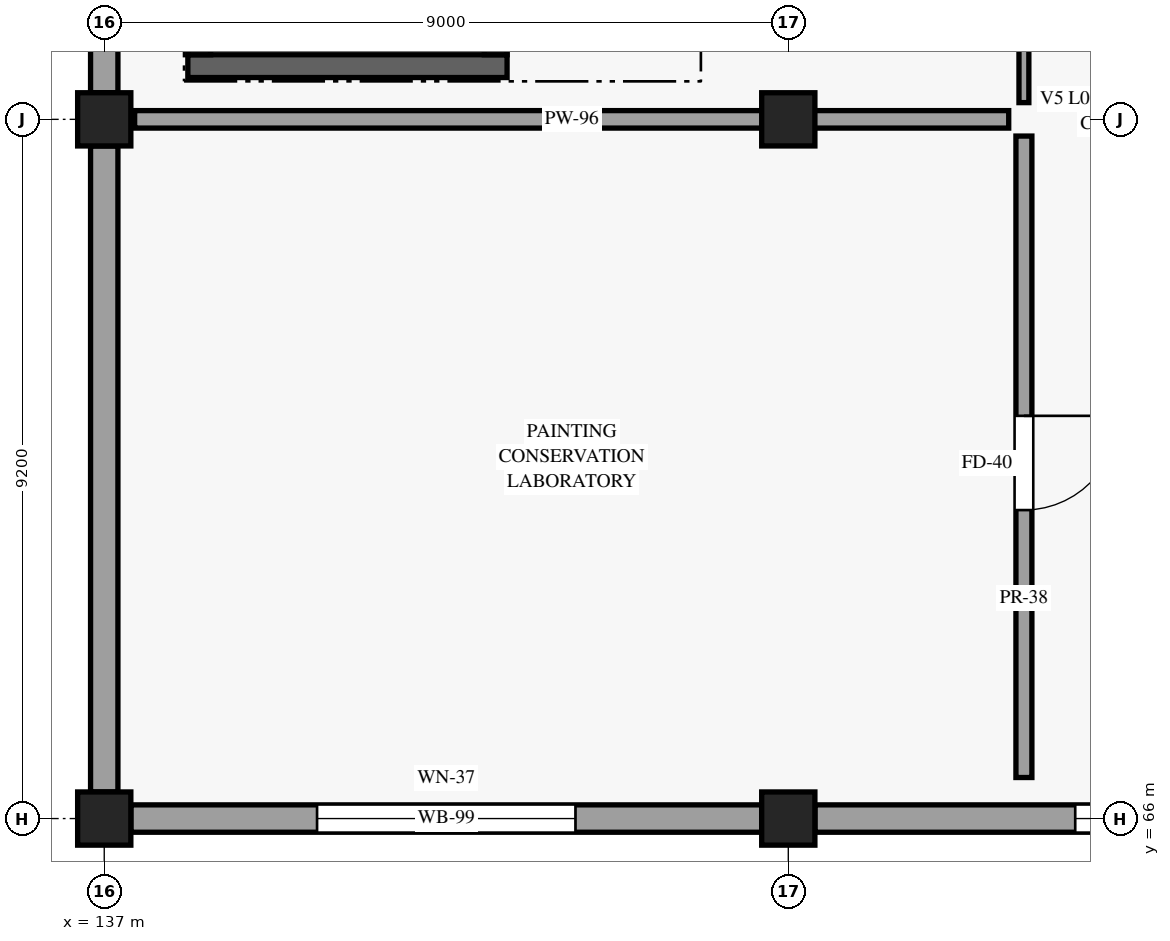
"""IFC4 building model, lengths in metres.
Left out: names, types, materials, properties, quantities, classifications, styles, units other than length and angle.
Written with IfcOpenShell. Run it as: python <this file> out.ifc"""

import sys

from ifc_helpers import new_model, si_unit, direction, frame, frame_2d, origin, origin_2d, place, context, subcontext, project, spatial, rectangle, extrude, element, fill, save


model = new_model("IFC4")
c1 = context("Model", 3, precision=1e-05, world=origin(), true_north=direction((0.0, 1.0)))
c2 = subcontext(c1, "Body", "Model", "MODEL_VIEW")
j1 = project(units=[si_unit("LENGTHUNIT", "METRE"), si_unit("PLANEANGLEUNIT", "RADIAN")], contexts=[c1])
p1 = place(None, origin())
s1 = spatial("IfcSite", under=j1, at=p1, CompositionType="ELEMENT")
p2 = place(p1, origin())
s2 = spatial("IfcBuilding", under=s1, at=p2, CompositionType="ELEMENT")
p3 = place(p2, frame((0.0, 0.0, 5.4)))
s3 = spatial("IfcBuildingStorey", under=s2, at=p3, CompositionType="ELEMENT", Elevation=5.4)
for number, where, z_axis, x_axis in (
    (1, (137.0, 66.0, 0.0), (0.0, 0.0, 1.0), (1.0, 0.0, 0.0)),
    (2, (137.0, 75.2, 0.0), (0.0, 0.0, 1.0), (1.0, 0.0, 0.0)),
    (3, (146.0, 66.0, 0.0), (0.0, 0.0, 1.0), (1.0, 0.0, 0.0)),
    (4, (146.0, 75.2, 0.0), (0.0, 0.0, 1.0), (1.0, 0.0, 0.0)),
):
    element("IfcColumn", number, at=place(p3, frame(where, z_axis=z_axis, x_axis=x_axis)), inside=s3, PredefinedType="COLUMN", context=c2, shape_type="SweptSolid", body=[
        extrude(rectangle(XDim=0.7, YDim=0.7, at=origin_2d()), origin(), (0.0, 0.0, 1.0), 4.8),
    ])
p4 = place(p3, frame((137.35, 66.0, 0.0), z_axis=(0.0, 0.0, 1.0), x_axis=(1.0, 0.0, 0.0)))
e5 = element("IfcWall", 5, at=p4, inside=s3, PredefinedType="STANDARD", context=c2, shape_type="SweptSolid", body=[
    extrude(rectangle(XDim=8.3, YDim=0.36, at=frame_2d((4.15, 0.0))), origin(), (0.0, 0.0, 1.0), 3.175),
])
p5 = place(p4, frame((5.85, 0.0, 0.85), z_axis=(0.0, 0.0, 1.0), x_axis=(-1.0, 0.0, 0.0)))
e6 = element("IfcOpeningElement", 6, at=p5, cuts=e5, PredefinedType="OPENING", context=c2, shape_type="SweptSolid", body=[
    extrude(rectangle(XDim=3.4, YDim=2.1, at=frame_2d((1.7, 1.05))), frame((0.0, 0.19, 0.0), z_axis=(0.0, -1.0, 0.0), x_axis=(1.0, 0.0, 0.0)), (0.0, 0.0, 1.0), 0.38),
])
p6 = place(p3, frame((146.35, 66.0, 0.0), z_axis=(0.0, 0.0, 1.0), x_axis=(1.0, 0.0, 0.0)))
e7 = element("IfcWall", 7, at=p6, inside=s3, PredefinedType="STANDARD", context=c2, shape_type="SweptSolid", body=[
    extrude(rectangle(XDim=8.3, YDim=0.36, at=frame_2d((4.15, 0.0))), origin(), (0.0, 0.0, 1.0), 3.175),
])
p7 = place(p6, frame((4.875, 0.0, 0.85), z_axis=(0.0, 0.0, 1.0), x_axis=(-1.0, 0.0, 0.0)))
e8 = element("IfcOpeningElement", 8, at=p7, cuts=e7, PredefinedType="OPENING", context=c2, shape_type="SweptSolid", body=[
    extrude(rectangle(XDim=1.45, YDim=1.85, at=frame_2d((0.725, 0.925))), frame((0.0, 0.19, 0.0), z_axis=(0.0, -1.0, 0.0), x_axis=(1.0, 0.0, 0.0)), (0.0, 0.0, 1.0), 0.38),
])
for number, where, z_axis, x_axis in (
    (9, (137.0, 66.35, 0.0), (0.0, 0.0, 1.0), (0.0, 1.0, 0.0)),
    (10, (137.0, 75.55, 0.0), (0.0, 0.0, 1.0), (0.0, 1.0, 0.0)),
):
    element("IfcWall", number, at=place(p3, frame(where, z_axis=z_axis, x_axis=x_axis)), inside=s3, PredefinedType="STANDARD", context=c2, shape_type="SweptSolid", body=[
        extrude(rectangle(XDim=8.5, YDim=0.36, at=frame_2d((4.25, 0.0))), origin(), (0.0, 0.0, 1.0), 3.175),
    ])
p8 = place(p3, frame((138.1, 75.9, 0.0), z_axis=(0.0, 0.0, 1.0), x_axis=(1.0, 0.0, 0.0)))
e11 = element("IfcWall", 11, at=p8, inside=s3, PredefinedType="SHEAR", context=c2, shape_type="SweptSolid", body=[
    extrude(rectangle(XDim=4.2, YDim=0.3, at=frame_2d((2.1, 0.0))), origin(), (0.0, 0.0, 1.0), 4.44),
])
for number, where, z_axis, x_axis in (
    (12, (138.25, 76.05, 0.0), (0.0, 0.0, 1.0), (0.0, 1.0, 0.0)),
    (13, (142.15, 76.05, 0.0), (0.0, 0.0, 1.0), (0.0, 1.0, 0.0)),
):
    element("IfcWall", number, at=place(p3, frame(where, z_axis=z_axis, x_axis=x_axis)), inside=s3, PredefinedType="SHEAR", context=c2, shape_type="SweptSolid", body=[
        extrude(rectangle(XDim=8.65, YDim=0.3, at=frame_2d((4.325, 0.0))), origin(), (0.0, 0.0, 1.0), 4.44),
    ])
p9 = place(p3, frame((149.1, 66.54, 0.0), z_axis=(0.0, 0.0, 1.0), x_axis=(0.0, 1.0, 0.0)))
e14 = element("IfcWall", 14, at=p9, inside=s3, PredefinedType="PARTITIONING", context=c2, shape_type="SweptSolid", body=[
    extrude(rectangle(XDim=8.44, YDim=0.21, at=frame_2d((4.22, 0.0))), origin(), (0.0, 0.0, 1.0), 3.175),
])
p10 = place(p9, frame((4.759, 0.0, 0.0), z_axis=(0.0, 0.0, 1.0), x_axis=(-1.0, 0.0, 0.0)))
e15 = element("IfcOpeningElement", 15, at=p10, cuts=e14, PredefinedType="OPENING", context=c2, shape_type="SweptSolid", body=[
    extrude(rectangle(XDim=1.24, YDim=2.32, at=frame_2d((0.62, 1.16))), frame((0.0, 0.115, 0.0), z_axis=(0.0, -1.0, 0.0), x_axis=(1.0, 0.0, 0.0)), (0.0, 0.0, 1.0), 0.23),
])
p11 = place(p3, frame((137.4, 75.2, 0.0), z_axis=(0.0, 0.0, 1.0), x_axis=(1.0, 0.0, 0.0)))
e16 = element("IfcWall", 16, at=p11, inside=s3, PredefinedType="PARTITIONING", context=c2, shape_type="SweptSolid", body=[
    extrude(rectangle(XDim=11.5, YDim=0.23, at=frame_2d((5.75, 0.0))), origin(), (0.0, 0.0, 1.0), 3.175),
])
p12 = place(p3, frame((149.1, 75.42, 0.0), z_axis=(0.0, 0.0, 1.0), x_axis=(0.0, 1.0, 0.0)))
e17 = element("IfcWall", 17, at=p12, inside=s3, PredefinedType="PARTITIONING", context=c2, shape_type="SweptSolid", body=[
    extrude(rectangle(XDim=8.76, YDim=0.13, at=frame_2d((4.38, 0.0))), origin(), (0.0, 0.0, 1.0), 3.175),
])
p13 = place(p12, frame((4.83, 0.0, 0.0), z_axis=(0.0, 0.0, 1.0), x_axis=(-1.0, 0.0, 0.0)))
e18 = element("IfcOpeningElement", 18, at=p13, cuts=e17, PredefinedType="OPENING", context=c2, shape_type="SweptSolid", body=[
    extrude(rectangle(XDim=0.95, YDim=2.15, at=frame_2d((0.475, 1.075))), frame((0.0, 0.075, 0.0), z_axis=(0.0, -1.0, 0.0), x_axis=(1.0, 0.0, 0.0)), (0.0, 0.0, 1.0), 0.15),
])
p14 = place(p5, origin())
e19 = element("IfcWindow", 19, at=p14, inside=s3, PartitioningType="SINGLE_PANEL", PredefinedType="WINDOW", context=c2, shape_type="SweptSolid", body=[
    extrude(rectangle(XDim=3.4, YDim=2.1, at=frame_2d((1.7, 1.05))), frame((0.0, 0.03, 0.0), z_axis=(0.0, -1.0, 0.0), x_axis=(1.0, 0.0, 0.0)), (0.0, 0.0, 1.0), 0.06),
])
fill(e6, e19)
p15 = place(p7, origin())
e20 = element("IfcWindow", 20, at=p15, inside=s3, PartitioningType="SINGLE_PANEL", PredefinedType="WINDOW", context=c2, shape_type="SweptSolid", body=[
    extrude(rectangle(XDim=1.45, YDim=1.85, at=frame_2d((0.725, 0.925))), frame((0.0, 0.03, 0.0), z_axis=(0.0, -1.0, 0.0), x_axis=(1.0, 0.0, 0.0)), (0.0, 0.0, 1.0), 0.06),
])
fill(e8, e20)
p16 = place(p10, origin())
e21 = element("IfcDoor", 21, at=p16, inside=s3, OperationType="SINGLE_SWING_LEFT", PredefinedType="DOOR", context=c2, shape_type="SweptSolid", body=[
    extrude(rectangle(XDim=1.24, YDim=2.32, at=frame_2d((0.62, 1.16))), frame((0.0, 0.025, 0.0), z_axis=(0.0, -1.0, 0.0), x_axis=(1.0, 0.0, 0.0)), (0.0, 0.0, 1.0), 0.05),
])
fill(e15, e21)
save(model, sys.argv[1])
